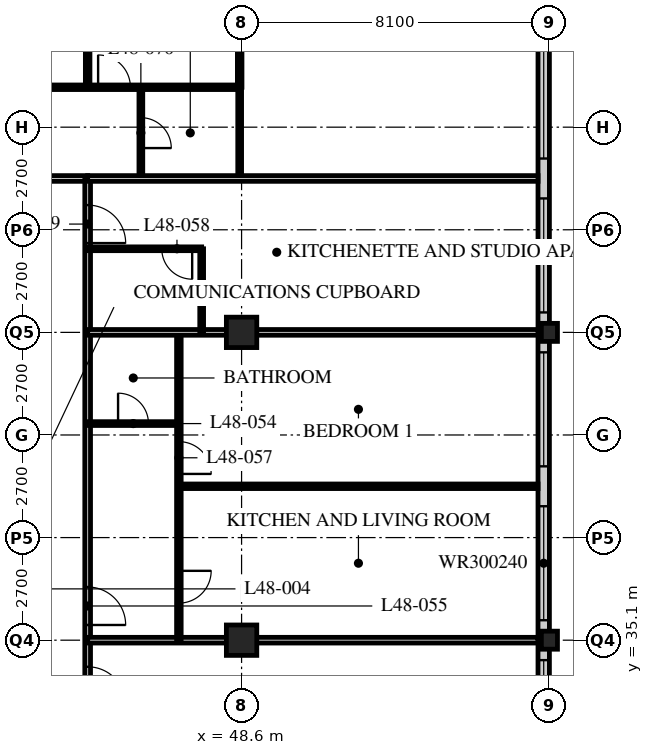
"""IFC4 building model, lengths in metres.
Left out: names, types, materials, properties, quantities, classifications, styles, units other than length and angle.
Written with IfcOpenShell. Run it as: python <this file> out.ifc"""

import sys

from ifc_helpers import new_model, si_unit, direction, frame, frame_2d, origin, origin_2d, place, context, subcontext, project, spatial, rectangle, hollow_rectangle, i_section, extrude, element, fill, save


model = new_model("IFC4")
c1 = context("Model", 3, precision=1e-05, world=origin(), true_north=direction((0.0, 1.0)))
c2 = subcontext(c1, "Body", "Model", "MODEL_VIEW")
j1 = project(units=[si_unit("LENGTHUNIT", "METRE"), si_unit("PLANEANGLEUNIT", "RADIAN")], contexts=[c1])
p1 = place(None, origin())
s1 = spatial("IfcSite", under=j1, at=p1, CompositionType="ELEMENT")
p2 = place(p1, origin())
s2 = spatial("IfcBuilding", under=s1, at=p2, CompositionType="ELEMENT")
p3 = place(p2, frame((0.0, 0.0, 188.4)))
s3 = spatial("IfcBuildingStorey", under=s2, at=p3, CompositionType="ELEMENT", Elevation=188.4)
for number, where, z_axis, x_axis in (
    (1, (48.6, 35.1, 0.0), (0.0, 0.0, 1.0), (1.0, 0.0, 0.0)),
    (2, (48.6, 43.2, 0.0), (0.0, 0.0, 1.0), (1.0, 0.0, 0.0)),
):
    element("IfcColumn", number, at=place(p3, frame(where, z_axis=z_axis, x_axis=x_axis)), inside=s3, PredefinedType="COLUMN", context=c2, shape_type="SweptSolid", body=[
        extrude(hollow_rectangle(XDim=0.8, YDim=0.8, WallThickness=0.08, at=origin_2d()), origin(), (0.0, 0.0, 1.0), 3.6),
    ])
for number, where, z_axis, x_axis in (
    (3, (56.7, 35.1, 0.0), (0.0, 0.0, 1.0), (1.0, 0.0, 0.0)),
    (4, (56.7, 43.2, 0.0), (0.0, 0.0, 1.0), (1.0, 0.0, 0.0)),
):
    element("IfcColumn", number, at=place(p3, frame(where, z_axis=z_axis, x_axis=x_axis)), inside=s3, PredefinedType="COLUMN", context=c2, shape_type="SweptSolid", body=[
        extrude(i_section(OverallWidth=0.424, OverallDepth=0.475, WebThickness=0.048, FlangeThickness=0.077, FilletRadius=0.015, at=origin_2d()), origin(), (0.0, 0.0, 1.0), 3.6),
    ])
p4 = place(p3, frame((56.55, 19.2, 0.0), z_axis=(0.0, 0.0, 1.0), x_axis=(0.0, 1.0, 0.0)))
e5 = element("IfcWall", 5, at=p4, inside=s3, PredefinedType="SOLIDWALL", context=c2, shape_type="SweptSolid", body=[
    extrude(rectangle(XDim=32.1, YDim=0.3, at=frame_2d((16.05, 0.0))), origin(), (0.0, 0.0, 1.0), 3.39),
])
p5 = place(p4, frame((0.225, 0.0, 0.6)))
e6 = element("IfcOpeningElement", 6, at=p5, cuts=e5, PredefinedType="OPENING", context=c2, shape_type="SweptSolid", body=[
    extrude(rectangle(XDim=3.0, YDim=2.4, at=frame_2d((1.5, 1.2))), frame((0.0, 0.16, 0.0), z_axis=(0.0, -1.0, 0.0), x_axis=(1.0, 0.0, 0.0)), (0.0, 0.0, 1.0), 0.32),
])
p6 = place(p4, frame((4.275, 0.0, 0.6)))
e7 = element("IfcOpeningElement", 7, at=p6, cuts=e5, PredefinedType="OPENING", context=c2, shape_type="SweptSolid", body=[
    extrude(rectangle(XDim=3.0, YDim=2.4, at=frame_2d((1.5, 1.2))), frame((0.0, 0.16, 0.0), z_axis=(0.0, -1.0, 0.0), x_axis=(1.0, 0.0, 0.0)), (0.0, 0.0, 1.0), 0.32),
])
p7 = place(p4, frame((8.325, 0.0, 0.6)))
e8 = element("IfcOpeningElement", 8, at=p7, cuts=e5, PredefinedType="OPENING", context=c2, shape_type="SweptSolid", body=[
    extrude(rectangle(XDim=3.0, YDim=2.4, at=frame_2d((1.5, 1.2))), frame((0.0, 0.16, 0.0), z_axis=(0.0, -1.0, 0.0), x_axis=(1.0, 0.0, 0.0)), (0.0, 0.0, 1.0), 0.32),
])
p8 = place(p4, frame((12.375, 0.0, 0.6)))
e9 = element("IfcOpeningElement", 9, at=p8, cuts=e5, PredefinedType="OPENING", context=c2, shape_type="SweptSolid", body=[
    extrude(rectangle(XDim=3.0, YDim=2.4, at=frame_2d((1.5, 1.2))), frame((0.0, 0.16, 0.0), z_axis=(0.0, -1.0, 0.0), x_axis=(1.0, 0.0, 0.0)), (0.0, 0.0, 1.0), 0.32),
])
p9 = place(p4, frame((16.425, 0.0, 0.6)))
e10 = element("IfcOpeningElement", 10, at=p9, cuts=e5, PredefinedType="OPENING", context=c2, shape_type="SweptSolid", body=[
    extrude(rectangle(XDim=3.0, YDim=2.4, at=frame_2d((1.5, 1.2))), frame((0.0, 0.16, 0.0), z_axis=(0.0, -1.0, 0.0), x_axis=(1.0, 0.0, 0.0)), (0.0, 0.0, 1.0), 0.32),
])
p10 = place(p4, frame((20.475, 0.0, 0.6)))
e11 = element("IfcOpeningElement", 11, at=p10, cuts=e5, PredefinedType="OPENING", context=c2, shape_type="SweptSolid", body=[
    extrude(rectangle(XDim=3.0, YDim=2.4, at=frame_2d((1.5, 1.2))), frame((0.0, 0.16, 0.0), z_axis=(0.0, -1.0, 0.0), x_axis=(1.0, 0.0, 0.0)), (0.0, 0.0, 1.0), 0.32),
])
p11 = place(p4, frame((24.525, 0.0, 0.6)))
e12 = element("IfcOpeningElement", 12, at=p11, cuts=e5, PredefinedType="OPENING", context=c2, shape_type="SweptSolid", body=[
    extrude(rectangle(XDim=3.0, YDim=2.4, at=frame_2d((1.5, 1.2))), frame((0.0, 0.16, 0.0), z_axis=(0.0, -1.0, 0.0), x_axis=(1.0, 0.0, 0.0)), (0.0, 0.0, 1.0), 0.32),
])
p12 = place(p4, frame((28.575, 0.0, 0.6)))
e13 = element("IfcOpeningElement", 13, at=p12, cuts=e5, PredefinedType="OPENING", context=c2, shape_type="SweptSolid", body=[
    extrude(rectangle(XDim=3.0, YDim=2.4, at=frame_2d((1.5, 1.2))), frame((0.0, 0.16, 0.0), z_axis=(0.0, -1.0, 0.0), x_axis=(1.0, 0.0, 0.0)), (0.0, 0.0, 1.0), 0.32),
])
p13 = place(p3, frame((12.15, 47.25, 0.0), z_axis=(0.0, 0.0, 1.0), x_axis=(1.0, 0.0, 0.0)))
e14 = element("IfcWall", 14, at=p13, inside=s3, PredefinedType="PARTITIONING", context=c2, shape_type="SweptSolid", body=[
    extrude(rectangle(XDim=32.4, YDim=0.15, at=frame_2d((16.2, 0.0))), origin(), (0.0, 0.0, 1.0), 3.39),
])
p14 = place(p13, frame((4.45, 0.0, 0.0)))
e15 = element("IfcOpeningElement", 15, at=p14, cuts=e14, PredefinedType="OPENING", context=c2, shape_type="SweptSolid", body=[
    extrude(rectangle(XDim=1.0, YDim=2.1, at=frame_2d((0.5, 1.05))), frame((0.0, 0.085, 0.0), z_axis=(0.0, -1.0, 0.0), x_axis=(1.0, 0.0, 0.0)), (0.0, 0.0, 1.0), 0.17),
])
p15 = place(p13, frame((16.6, 0.0, 0.0)))
e16 = element("IfcOpeningElement", 16, at=p15, cuts=e14, PredefinedType="OPENING", context=c2, shape_type="SweptSolid", body=[
    extrude(rectangle(XDim=1.0, YDim=2.1, at=frame_2d((0.5, 1.05))), frame((0.0, 0.085, 0.0), z_axis=(0.0, -1.0, 0.0), x_axis=(1.0, 0.0, 0.0)), (0.0, 0.0, 1.0), 0.17),
])
p16 = place(p13, frame((29.875, 0.0, 0.0)))
e17 = element("IfcOpeningElement", 17, at=p16, cuts=e14, PredefinedType="OPENING", context=c2, shape_type="SweptSolid", body=[
    extrude(rectangle(XDim=1.0, YDim=2.1, at=frame_2d((0.5, 1.05))), frame((0.0, 0.085, 0.0), z_axis=(0.0, -1.0, 0.0), x_axis=(1.0, 0.0, 0.0)), (0.0, 0.0, 1.0), 0.17),
])
p17 = place(p13, frame((1.525, 0.0, 0.0)))
e18 = element("IfcOpeningElement", 18, at=p17, cuts=e14, PredefinedType="OPENING", context=c2, shape_type="SweptSolid", body=[
    extrude(rectangle(XDim=1.0, YDim=2.1, at=frame_2d((0.5, 1.05))), frame((0.0, 0.085, 0.0), z_axis=(0.0, -1.0, 0.0), x_axis=(1.0, 0.0, 0.0)), (0.0, 0.0, 1.0), 0.17),
])
p18 = place(p3, frame((44.55, 18.9, 0.0), z_axis=(0.0, 0.0, 1.0), x_axis=(0.0, 1.0, 0.0)))
e19 = element("IfcWall", 19, at=p18, inside=s3, PredefinedType="PARTITIONING", context=c2, shape_type="SweptSolid", body=[
    extrude(rectangle(XDim=28.35, YDim=0.15, at=frame_2d((14.175, 0.0))), origin(), (0.0, 0.0, 1.0), 3.39),
])
p19 = place(p18, frame((0.4, 0.0, 0.0)))
e20 = element("IfcOpeningElement", 20, at=p19, cuts=e19, PredefinedType="OPENING", context=c2, shape_type="SweptSolid", body=[
    extrude(rectangle(XDim=1.0, YDim=2.1, at=frame_2d((0.5, 1.05))), frame((0.0, 0.085, 0.0), z_axis=(0.0, -1.0, 0.0), x_axis=(1.0, 0.0, 0.0)), (0.0, 0.0, 1.0), 0.17),
])
p20 = place(p18, frame((10.45, 0.0, 0.0)))
e21 = element("IfcOpeningElement", 21, at=p20, cuts=e19, PredefinedType="OPENING", context=c2, shape_type="SweptSolid", body=[
    extrude(rectangle(XDim=1.0, YDim=2.1, at=frame_2d((0.5, 1.05))), frame((0.0, 0.085, 0.0), z_axis=(0.0, -1.0, 0.0), x_axis=(1.0, 0.0, 0.0)), (0.0, 0.0, 1.0), 0.17),
])
p21 = place(p18, frame((14.5, 0.0, 0.0)))
e22 = element("IfcOpeningElement", 22, at=p21, cuts=e19, PredefinedType="OPENING", context=c2, shape_type="SweptSolid", body=[
    extrude(rectangle(XDim=1.0, YDim=2.1, at=frame_2d((0.5, 1.05))), frame((0.0, 0.085, 0.0), z_axis=(0.0, -1.0, 0.0), x_axis=(1.0, 0.0, 0.0)), (0.0, 0.0, 1.0), 0.17),
])
p22 = place(p18, frame((16.6, 0.0, 0.0)))
e23 = element("IfcOpeningElement", 23, at=p22, cuts=e19, PredefinedType="OPENING", context=c2, shape_type="SweptSolid", body=[
    extrude(rectangle(XDim=1.0, YDim=2.1, at=frame_2d((0.5, 1.05))), frame((0.0, 0.085, 0.0), z_axis=(0.0, -1.0, 0.0), x_axis=(1.0, 0.0, 0.0)), (0.0, 0.0, 1.0), 0.17),
])
p23 = place(p18, frame((26.65, 0.0, 0.0)))
e24 = element("IfcOpeningElement", 24, at=p23, cuts=e19, PredefinedType="OPENING", context=c2, shape_type="SweptSolid", body=[
    extrude(rectangle(XDim=1.0, YDim=2.1, at=frame_2d((0.5, 1.05))), frame((0.0, 0.085, 0.0), z_axis=(0.0, -1.0, 0.0), x_axis=(1.0, 0.0, 0.0)), (0.0, 0.0, 1.0), 0.17),
])
p24 = place(p3, frame((44.55, 35.1, 0.0), z_axis=(0.0, 0.0, 1.0), x_axis=(1.0, 0.0, 0.0)))
e25 = element("IfcWall", 25, at=p24, inside=s3, PredefinedType="PARTITIONING", context=c2, shape_type="SweptSolid", body=[
    extrude(rectangle(XDim=11.85, YDim=0.15, at=frame_2d((5.925, 0.0))), origin(), (0.0, 0.0, 1.0), 2.778),
])
p25 = place(p3, frame((46.95, 35.1, 0.0), z_axis=(0.0, 0.0, 1.0), x_axis=(0.0, 1.0, 0.0)))
e26 = element("IfcWall", 26, at=p25, inside=s3, PredefinedType="PARTITIONING", context=c2, shape_type="SweptSolid", body=[
    extrude(rectangle(XDim=8.1, YDim=0.12, at=frame_2d((4.05, 0.0))), origin(), (0.0, 0.0, 1.0), 3.39),
])
p26 = place(p25, frame((0.975, 0.0, 0.0)))
e27 = element("IfcOpeningElement", 27, at=p26, cuts=e26, PredefinedType="OPENING", context=c2, shape_type="SweptSolid", body=[
    extrude(rectangle(XDim=0.85, YDim=2.1, at=frame_2d((0.425, 1.05))), frame((0.0, 0.07, 0.0), z_axis=(0.0, -1.0, 0.0), x_axis=(1.0, 0.0, 0.0)), (0.0, 0.0, 1.0), 0.14),
])
p27 = place(p25, frame((4.375, 0.0, 0.0)))
e28 = element("IfcOpeningElement", 28, at=p27, cuts=e26, PredefinedType="OPENING", context=c2, shape_type="SweptSolid", body=[
    extrude(rectangle(XDim=0.85, YDim=2.1, at=frame_2d((0.425, 1.05))), frame((0.0, 0.07, 0.0), z_axis=(0.0, -1.0, 0.0), x_axis=(1.0, 0.0, 0.0)), (0.0, 0.0, 1.0), 0.14),
])
p28 = place(p3, frame((44.55, 40.8, 0.0), z_axis=(0.0, 0.0, 1.0), x_axis=(1.0, 0.0, 0.0)))
e29 = element("IfcWall", 29, at=p28, inside=s3, PredefinedType="PARTITIONING", context=c2, shape_type="SweptSolid", body=[
    extrude(rectangle(XDim=2.4, YDim=0.1, at=frame_2d((1.2, 0.0))), origin(), (0.0, 0.0, 1.0), 3.39),
])
p29 = place(p28, frame((0.8, 0.0, 0.0)))
e30 = element("IfcOpeningElement", 30, at=p29, cuts=e29, PredefinedType="OPENING", context=c2, shape_type="SweptSolid", body=[
    extrude(rectangle(XDim=0.8, YDim=2.1, at=frame_2d((0.4, 1.05))), frame((0.0, 0.06, 0.0), z_axis=(0.0, -1.0, 0.0), x_axis=(1.0, 0.0, 0.0)), (0.0, 0.0, 1.0), 0.12),
])
p30 = place(p3, frame((46.95, 39.15, 0.0), z_axis=(0.0, 0.0, 1.0), x_axis=(1.0, 0.0, 0.0)))
e31 = element("IfcWall", 31, at=p30, inside=s3, PredefinedType="PARTITIONING", context=c2, shape_type="SweptSolid", body=[
    extrude(rectangle(XDim=9.45, YDim=0.12, at=frame_2d((4.725, 0.0))), origin(), (0.0, 0.0, 1.0), 3.39),
])
p31 = place(p3, frame((44.55, 43.2, 0.0), z_axis=(0.0, 0.0, 1.0), x_axis=(1.0, 0.0, 0.0)))
e32 = element("IfcWall", 32, at=p31, inside=s3, PredefinedType="PARTITIONING", context=c2, shape_type="SweptSolid", body=[
    extrude(rectangle(XDim=11.85, YDim=0.15, at=frame_2d((5.925, 0.0))), origin(), (0.0, 0.0, 1.0), 2.778),
])
p32 = place(p3, frame((47.55, 43.2, 0.0), z_axis=(0.0, 0.0, 1.0), x_axis=(0.0, 1.0, 0.0)))
e33 = element("IfcWall", 33, at=p32, inside=s3, PredefinedType="PARTITIONING", context=c2, shape_type="SweptSolid", body=[
    extrude(rectangle(XDim=2.2, YDim=0.1, at=frame_2d((1.1, 0.0))), origin(), (0.0, 0.0, 1.0), 3.39),
])
p33 = place(p3, frame((44.55, 45.4, 0.0), z_axis=(0.0, 0.0, 1.0), x_axis=(1.0, 0.0, 0.0)))
e34 = element("IfcWall", 34, at=p33, inside=s3, PredefinedType="PARTITIONING", context=c2, shape_type="SweptSolid", body=[
    extrude(rectangle(XDim=3.0, YDim=0.1, at=frame_2d((1.5, 0.0))), origin(), (0.0, 0.0, 1.0), 3.39),
])
p34 = place(p33, frame((1.95, 0.0, 0.0)))
e35 = element("IfcOpeningElement", 35, at=p34, cuts=e34, PredefinedType="OPENING", context=c2, shape_type="SweptSolid", body=[
    extrude(rectangle(XDim=0.8, YDim=2.1, at=frame_2d((0.4, 1.05))), frame((0.0, 0.06, 0.0), z_axis=(0.0, -1.0, 0.0), x_axis=(1.0, 0.0, 0.0)), (0.0, 0.0, 1.0), 0.12),
])
p35 = place(p3, frame((45.95, 47.25, 0.0), z_axis=(0.0, 0.0, 1.0), x_axis=(0.0, 1.0, 0.0)))
e36 = element("IfcWall", 36, at=p35, inside=s3, PredefinedType="PARTITIONING", context=c2, shape_type="SweptSolid", body=[
    extrude(rectangle(XDim=2.4, YDim=0.1, at=frame_2d((1.2, 0.0))), origin(), (0.0, 0.0, 1.0), 3.39),
])
p36 = place(p35, frame((0.8, 0.0, 0.0)))
e37 = element("IfcOpeningElement", 37, at=p36, cuts=e36, PredefinedType="OPENING", context=c2, shape_type="SweptSolid", body=[
    extrude(rectangle(XDim=0.8, YDim=2.1, at=frame_2d((0.4, 1.05))), frame((0.0, 0.06, 0.0), z_axis=(0.0, -1.0, 0.0), x_axis=(1.0, 0.0, 0.0)), (0.0, 0.0, 1.0), 0.12),
])
p37 = place(p3, frame((48.55, 47.25, 0.0), z_axis=(0.0, 0.0, 1.0), x_axis=(0.0, 1.0, 0.0)))
e38 = element("IfcWall", 38, at=p37, inside=s3, PredefinedType="PARTITIONING", context=c2, shape_type="SweptSolid", body=[
    extrude(rectangle(XDim=2.4, YDim=0.1, at=frame_2d((1.2, 0.0))), origin(), (0.0, 0.0, 1.0), 2.778),
])
p38 = place(p3, frame((44.55, 49.65, 0.0), z_axis=(0.0, 0.0, 1.0), x_axis=(0.0, 1.0, 0.0)))
e39 = element("IfcWall", 39, at=p38, inside=s3, PredefinedType="PARTITIONING", context=c2, shape_type="SweptSolid", body=[
    extrude(rectangle(XDim=9.45, YDim=0.12, at=frame_2d((4.725, 0.0))), origin(), (0.0, 0.0, 1.0), 3.39),
])
p39 = place(p3, frame((44.55, 47.25, 0.0), z_axis=(0.0, 0.0, 1.0), x_axis=(1.0, 0.0, 0.0)))
e40 = element("IfcWall", 40, at=p39, inside=s3, PredefinedType="PARTITIONING", context=c2, shape_type="SweptSolid", body=[
    extrude(rectangle(XDim=11.85, YDim=0.15, at=frame_2d((5.925, 0.0))), origin(), (0.0, 0.0, 1.0), 3.39),
])
p40 = place(p3, frame((8.15, 49.65, 0.0), z_axis=(0.0, 0.0, 1.0), x_axis=(1.0, 0.0, 0.0)))
e41 = element("IfcWall", 41, at=p40, inside=s3, PredefinedType="PARTITIONING", context=c2, shape_type="SweptSolid", body=[
    extrude(rectangle(XDim=40.4, YDim=0.12, at=frame_2d((20.2, 0.0))), origin(), (0.0, 0.0, 1.0), 3.39),
])
p41 = place(p40, frame((9.025, 0.0, 0.0)))
e42 = element("IfcOpeningElement", 42, at=p41, cuts=e41, PredefinedType="OPENING", context=c2, shape_type="SweptSolid", body=[
    extrude(rectangle(XDim=0.85, YDim=2.1, at=frame_2d((0.425, 1.05))), frame((0.0, 0.07, 0.0), z_axis=(0.0, -1.0, 0.0), x_axis=(1.0, 0.0, 0.0)), (0.0, 0.0, 1.0), 0.14),
])
p42 = place(p40, frame((16.475, 0.0, 0.0)))
e43 = element("IfcOpeningElement", 43, at=p42, cuts=e41, PredefinedType="OPENING", context=c2, shape_type="SweptSolid", body=[
    extrude(rectangle(XDim=0.85, YDim=2.1, at=frame_2d((0.425, 1.05))), frame((0.0, 0.07, 0.0), z_axis=(0.0, -1.0, 0.0), x_axis=(1.0, 0.0, 0.0)), (0.0, 0.0, 1.0), 0.14),
])
p43 = place(p40, frame((21.175, 0.0, 0.0)))
e44 = element("IfcOpeningElement", 44, at=p43, cuts=e41, PredefinedType="OPENING", context=c2, shape_type="SweptSolid", body=[
    extrude(rectangle(XDim=0.85, YDim=2.1, at=frame_2d((0.425, 1.05))), frame((0.0, 0.07, 0.0), z_axis=(0.0, -1.0, 0.0), x_axis=(1.0, 0.0, 0.0)), (0.0, 0.0, 1.0), 0.14),
])
p44 = place(p40, frame((28.625, 0.0, 0.0)))
e45 = element("IfcOpeningElement", 45, at=p44, cuts=e41, PredefinedType="OPENING", context=c2, shape_type="SweptSolid", body=[
    extrude(rectangle(XDim=0.85, YDim=2.1, at=frame_2d((0.425, 1.05))), frame((0.0, 0.07, 0.0), z_axis=(0.0, -1.0, 0.0), x_axis=(1.0, 0.0, 0.0)), (0.0, 0.0, 1.0), 0.14),
])
p45 = place(p40, frame((32.825, 0.0, 0.0)))
e46 = element("IfcOpeningElement", 46, at=p45, cuts=e41, PredefinedType="OPENING", context=c2, shape_type="SweptSolid", body=[
    extrude(rectangle(XDim=0.85, YDim=2.1, at=frame_2d((0.425, 1.05))), frame((0.0, 0.07, 0.0), z_axis=(0.0, -1.0, 0.0), x_axis=(1.0, 0.0, 0.0)), (0.0, 0.0, 1.0), 0.14),
])
p46 = place(p40, frame((36.675, 0.0, 0.0)))
e47 = element("IfcOpeningElement", 47, at=p46, cuts=e41, PredefinedType="OPENING", context=c2, shape_type="SweptSolid", body=[
    extrude(rectangle(XDim=0.85, YDim=2.1, at=frame_2d((0.425, 1.05))), frame((0.0, 0.07, 0.0), z_axis=(0.0, -1.0, 0.0), x_axis=(1.0, 0.0, 0.0)), (0.0, 0.0, 1.0), 0.14),
])
p47 = place(p40, frame((6.725, 0.0, 0.0)))
e48 = element("IfcOpeningElement", 48, at=p47, cuts=e41, PredefinedType="OPENING", context=c2, shape_type="SweptSolid", body=[
    extrude(rectangle(XDim=0.85, YDim=2.1, at=frame_2d((0.425, 1.05))), frame((0.0, 0.07, 0.0), z_axis=(0.0, -1.0, 0.0), x_axis=(1.0, 0.0, 0.0)), (0.0, 0.0, 1.0), 0.14),
])
p48 = place(p40, frame((2.875, 0.0, 0.0)))
e49 = element("IfcOpeningElement", 49, at=p48, cuts=e41, PredefinedType="OPENING", context=c2, shape_type="SweptSolid", body=[
    extrude(rectangle(XDim=0.85, YDim=2.1, at=frame_2d((0.425, 1.05))), frame((0.0, 0.07, 0.0), z_axis=(0.0, -1.0, 0.0), x_axis=(1.0, 0.0, 0.0)), (0.0, 0.0, 1.0), 0.14),
])
p49 = place(p3, frame((48.55, 49.65, 0.0), z_axis=(0.0, 0.0, 1.0), x_axis=(0.0, 1.0, 0.0)))
e50 = element("IfcWall", 50, at=p49, inside=s3, PredefinedType="PARTITIONING", context=c2, shape_type="SweptSolid", body=[
    extrude(rectangle(XDim=1.25, YDim=0.12, at=frame_2d((0.625, 0.0))), origin(), (0.0, 0.0, 1.0), 2.778),
])
p50 = place(p8, origin())
e51 = element("IfcWindow", 51, at=p50, inside=s3, PartitioningType="SINGLE_PANEL", PredefinedType="WINDOW", context=c2, shape_type="SweptSolid", body=[
    extrude(rectangle(XDim=3.0, YDim=2.4, at=frame_2d((1.5, 1.2))), frame((0.0, 0.03, 0.0), z_axis=(0.0, -1.0, 0.0), x_axis=(1.0, 0.0, 0.0)), (0.0, 0.0, 1.0), 0.06),
])
fill(e9, e51)
p51 = place(p9, origin())
e52 = element("IfcWindow", 52, at=p51, inside=s3, PartitioningType="SINGLE_PANEL", PredefinedType="WINDOW", context=c2, shape_type="SweptSolid", body=[
    extrude(rectangle(XDim=3.0, YDim=2.4, at=frame_2d((1.5, 1.2))), frame((0.0, 0.03, 0.0), z_axis=(0.0, -1.0, 0.0), x_axis=(1.0, 0.0, 0.0)), (0.0, 0.0, 1.0), 0.06),
])
fill(e10, e52)
p52 = place(p10, origin())
e53 = element("IfcWindow", 53, at=p52, inside=s3, PartitioningType="SINGLE_PANEL", PredefinedType="WINDOW", context=c2, shape_type="SweptSolid", body=[
    extrude(rectangle(XDim=3.0, YDim=2.4, at=frame_2d((1.5, 1.2))), frame((0.0, 0.03, 0.0), z_axis=(0.0, -1.0, 0.0), x_axis=(1.0, 0.0, 0.0)), (0.0, 0.0, 1.0), 0.06),
])
fill(e11, e53)
p53 = place(p11, origin())
e54 = element("IfcWindow", 54, at=p53, inside=s3, PartitioningType="SINGLE_PANEL", PredefinedType="WINDOW", context=c2, shape_type="SweptSolid", body=[
    extrude(rectangle(XDim=3.0, YDim=2.4, at=frame_2d((1.5, 1.2))), frame((0.0, 0.03, 0.0), z_axis=(0.0, -1.0, 0.0), x_axis=(1.0, 0.0, 0.0)), (0.0, 0.0, 1.0), 0.06),
])
fill(e12, e54)
p54 = place(p12, origin())
e55 = element("IfcWindow", 55, at=p54, inside=s3, PartitioningType="SINGLE_PANEL", PredefinedType="WINDOW", context=c2, shape_type="SweptSolid", body=[
    extrude(rectangle(XDim=3.0, YDim=2.4, at=frame_2d((1.5, 1.2))), frame((0.0, 0.03, 0.0), z_axis=(0.0, -1.0, 0.0), x_axis=(1.0, 0.0, 0.0)), (0.0, 0.0, 1.0), 0.06),
])
fill(e13, e55)
p55 = place(p21, origin())
e56 = element("IfcDoor", 56, at=p55, inside=s3, OperationType="SINGLE_SWING_RIGHT", PredefinedType="DOOR", context=c2, shape_type="SweptSolid", body=[
    extrude(rectangle(XDim=1.0, YDim=2.1, at=frame_2d((0.5, 1.05))), frame((0.0, 0.025, 0.0), z_axis=(0.0, -1.0, 0.0), x_axis=(1.0, 0.0, 0.0)), (0.0, 0.0, 1.0), 0.05),
])
fill(e22, e56)
p56 = place(p29, origin())
e57 = element("IfcDoor", 57, at=p56, inside=s3, OperationType="SINGLE_SWING_LEFT", PredefinedType="DOOR", context=c2, shape_type="SweptSolid", body=[
    extrude(rectangle(XDim=0.8, YDim=2.1, at=frame_2d((0.4, 1.05))), frame((0.0, 0.025, 0.0), z_axis=(0.0, -1.0, 0.0), x_axis=(1.0, 0.0, 0.0)), (0.0, 0.0, 1.0), 0.05),
])
fill(e30, e57)
p57 = place(p22, origin())
e58 = element("IfcDoor", 58, at=p57, inside=s3, OperationType="SINGLE_SWING_RIGHT", PredefinedType="DOOR", context=c2, shape_type="SweptSolid", body=[
    extrude(rectangle(XDim=1.0, YDim=2.1, at=frame_2d((0.5, 1.05))), frame((0.0, 0.025, 0.0), z_axis=(0.0, -1.0, 0.0), x_axis=(1.0, 0.0, 0.0)), (0.0, 0.0, 1.0), 0.05),
])
fill(e23, e58)
p58 = place(p26, origin())
e59 = element("IfcDoor", 59, at=p58, inside=s3, OperationType="SINGLE_SWING_LEFT", PredefinedType="DOOR", context=c2, shape_type="SweptSolid", body=[
    extrude(rectangle(XDim=0.85, YDim=2.1, at=frame_2d((0.425, 1.05))), frame((0.0, 0.025, 0.0), z_axis=(0.0, -1.0, 0.0), x_axis=(1.0, 0.0, 0.0)), (0.0, 0.0, 1.0), 0.05),
])
fill(e27, e59)
p59 = place(p27, origin())
e60 = element("IfcDoor", 60, at=p59, inside=s3, OperationType="SINGLE_SWING_RIGHT", PredefinedType="DOOR", context=c2, shape_type="SweptSolid", body=[
    extrude(rectangle(XDim=0.85, YDim=2.1, at=frame_2d((0.425, 1.05))), frame((0.0, 0.025, 0.0), z_axis=(0.0, -1.0, 0.0), x_axis=(1.0, 0.0, 0.0)), (0.0, 0.0, 1.0), 0.05),
])
fill(e28, e60)
p60 = place(p34, origin())
e61 = element("IfcDoor", 61, at=p60, inside=s3, OperationType="SINGLE_SWING_LEFT", PredefinedType="DOOR", context=c2, shape_type="SweptSolid", body=[
    extrude(rectangle(XDim=0.8, YDim=2.1, at=frame_2d((0.4, 1.05))), frame((0.0, 0.025, 0.0), z_axis=(0.0, -1.0, 0.0), x_axis=(1.0, 0.0, 0.0)), (0.0, 0.0, 1.0), 0.05),
])
fill(e35, e61)
p61 = place(p23, origin())
e62 = element("IfcDoor", 62, at=p61, inside=s3, OperationType="SINGLE_SWING_RIGHT", PredefinedType="DOOR", context=c2, shape_type="SweptSolid", body=[
    extrude(rectangle(XDim=1.0, YDim=2.1, at=frame_2d((0.5, 1.05))), frame((0.0, 0.025, 0.0), z_axis=(0.0, -1.0, 0.0), x_axis=(1.0, 0.0, 0.0)), (0.0, 0.0, 1.0), 0.05),
])
fill(e24, e62)
p62 = place(p36, origin())
e63 = element("IfcDoor", 63, at=p62, inside=s3, OperationType="SINGLE_SWING_RIGHT", PredefinedType="DOOR", context=c2, shape_type="SweptSolid", body=[
    extrude(rectangle(XDim=0.8, YDim=2.1, at=frame_2d((0.4, 1.05))), frame((0.0, 0.025, 0.0), z_axis=(0.0, -1.0, 0.0), x_axis=(1.0, 0.0, 0.0)), (0.0, 0.0, 1.0), 0.05),
])
fill(e37, e63)
p63 = place(p46, origin())
e64 = element("IfcDoor", 64, at=p63, inside=s3, OperationType="SINGLE_SWING_LEFT", PredefinedType="DOOR", context=c2, shape_type="SweptSolid", body=[
    extrude(rectangle(XDim=0.85, YDim=2.1, at=frame_2d((0.425, 1.05))), frame((0.0, 0.025, 0.0), z_axis=(0.0, -1.0, 0.0), x_axis=(1.0, 0.0, 0.0)), (0.0, 0.0, 1.0), 0.05),
])
fill(e47, e64)
save(model, sys.argv[1])
